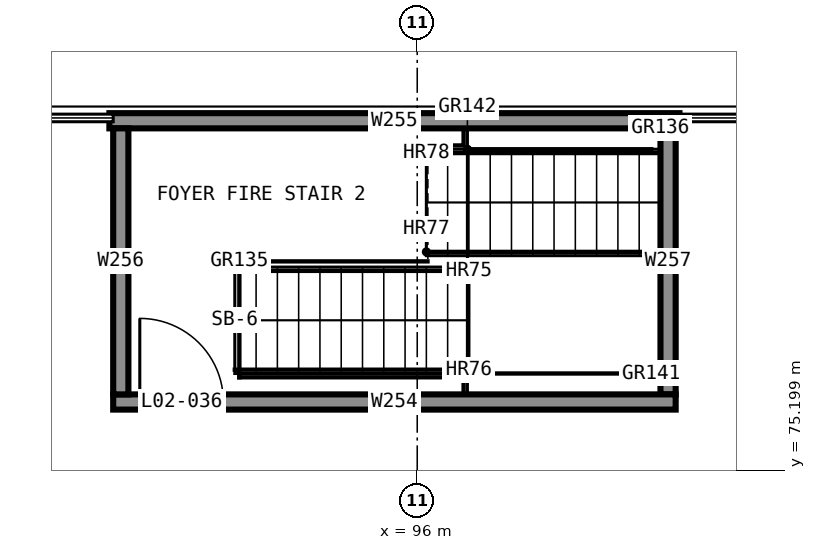
"""IFC4 building model, lengths in metres.
Left out: names, types, materials, properties, quantities, classifications, styles, units other than length and angle.
Written with IfcOpenShell. Run it as: python <this file> out.ifc"""

import sys

from ifc_helpers import new_model, si_unit, direction, frame, frame_2d, origin, place, context, subcontext, project, spatial, rectangle, extrude, element, fill, save


model = new_model("IFC4")
c1 = context("Model", 3, precision=1e-05, world=origin(), true_north=direction((0.0, 1.0)))
c2 = subcontext(c1, "Body", "Model", "MODEL_VIEW")
j1 = project(units=[si_unit("LENGTHUNIT", "METRE"), si_unit("PLANEANGLEUNIT", "RADIAN")], contexts=[c1])
p1 = place(None, origin())
s1 = spatial("IfcSite", under=j1, at=p1, CompositionType="ELEMENT")
p2 = place(p1, origin())
s2 = spatial("IfcBuilding", under=s1, at=p2, CompositionType="ELEMENT")
p3 = place(p2, frame((0.0, 0.0, 9.5)))
s3 = spatial("IfcBuildingStorey", under=s2, at=p3, CompositionType="ELEMENT", Elevation=9.5)
p4 = place(p3, frame((92.0, 76.1, 0.0), z_axis=(0.0, 0.0, 1.0), x_axis=(1.0, 0.0, 0.0)))
e1 = element("IfcWall", 1, at=p4, inside=s3, PredefinedType="SHEAR", context=c2, shape_type="SweptSolid", body=[
    extrude(rectangle(XDim=7.4, YDim=0.2, at=frame_2d((3.7, 0.0))), origin(), (0.0, 0.0, 1.0), 4.0),
])
p5 = place(p4, frame((0.35, 0.0, 0.0)))
e2 = element("IfcOpeningElement", 2, at=p5, cuts=e1, PredefinedType="OPENING", context=c2, shape_type="SweptSolid", body=[
    extrude(rectangle(XDim=1.1, YDim=2.1, at=frame_2d((0.55, 1.05))), frame((0.0, 0.11, 0.0), z_axis=(0.0, -1.0, 0.0), x_axis=(1.0, 0.0, 0.0)), (0.0, 0.0, 1.0), 0.22),
])
p6 = place(p3, frame((99.45, 79.8, 0.0), z_axis=(0.0, 0.0, 1.0), x_axis=(-1.0, 0.0, 0.0)))
e3 = element("IfcWall", 3, at=p6, inside=s3, PredefinedType="SHEAR", context=c2, shape_type="SweptSolid", body=[
    extrude(rectangle(XDim=7.5, YDim=0.2, at=frame_2d((3.75, 0.0))), origin(), (0.0, 0.0, 1.0), 4.0),
])
for number, where, z_axis, x_axis in (
    (4, (92.1, 79.7, 0.0), (0.0, 0.0, 1.0), (0.0, -1.0, 0.0)),
    (5, (99.3, 76.2, 0.0), (0.0, 0.0, 1.0), (0.0, 1.0, 0.0)),
):
    element("IfcWall", number, at=place(p3, frame(where, z_axis=z_axis, x_axis=x_axis)), inside=s3, PredefinedType="SHEAR", context=c2, shape_type="SweptSolid", body=[
        extrude(rectangle(XDim=3.5, YDim=0.2, at=frame_2d((1.75, 0.0))), origin(), (0.0, 0.0, 1.0), 4.0),
    ])
p7 = place(p5, origin())
e6 = element("IfcDoor", 6, at=p7, inside=s3, OperationType="SINGLE_SWING_RIGHT", PredefinedType="DOOR", context=c2, shape_type="SweptSolid", body=[
    extrude(rectangle(XDim=1.1, YDim=2.1, at=frame_2d((0.55, 1.05))), frame((0.0, 0.025, 0.0), z_axis=(0.0, -1.0, 0.0), x_axis=(1.0, 0.0, 0.0)), (0.0, 0.0, 1.0), 0.05),
])
fill(e2, e6)
save(model, sys.argv[1])
